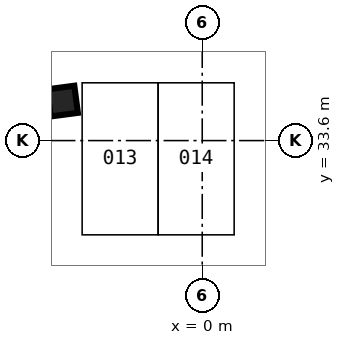
"""IFC4 building model, lengths in metres.
Left out: names, types, materials, properties, quantities, classifications, styles, units other than length and angle.
Written with IfcOpenShell. Run it as: python <this file> out.ifc"""

import sys

from ifc_helpers import new_model, si_unit, direction, frame, origin, origin_2d, place, context, subcontext, project, spatial, rectangle, extrude, element, save


model = new_model("IFC4")
c1 = context("Model", 3, precision=1e-05, world=origin(), true_north=direction((0.0, 1.0)))
c2 = subcontext(c1, "Body", "Model", "MODEL_VIEW")
j1 = project(units=[si_unit("LENGTHUNIT", "METRE"), si_unit("PLANEANGLEUNIT", "RADIAN")], contexts=[c1])
p1 = place(None, origin())
s1 = spatial("IfcSite", under=j1, at=p1, CompositionType="ELEMENT")
p2 = place(p1, origin())
s2 = spatial("IfcBuilding", under=s1, at=p2, CompositionType="ELEMENT")
p3 = place(p2, frame((0.0, 0.0, -9.0)))
s3 = spatial("IfcBuildingStorey", under=s2, at=p3, CompositionType="ELEMENT", Elevation=-9.0)
p4 = place(p3, frame((-4.594, 34.899, 0.0), z_axis=(0.0, 0.0, 1.0), x_axis=(-0.13052619222, 0.991444861374, 0.0)))
e1 = element("IfcColumn", 1, at=p4, inside=s3, PredefinedType="COLUMN", context=c2, shape_type="SweptSolid", body=[
    extrude(rectangle(XDim=0.9, YDim=0.9, at=origin_2d()), origin(), (0.0, 0.0, 1.0), 4.5),
])
save(model, sys.argv[1])
